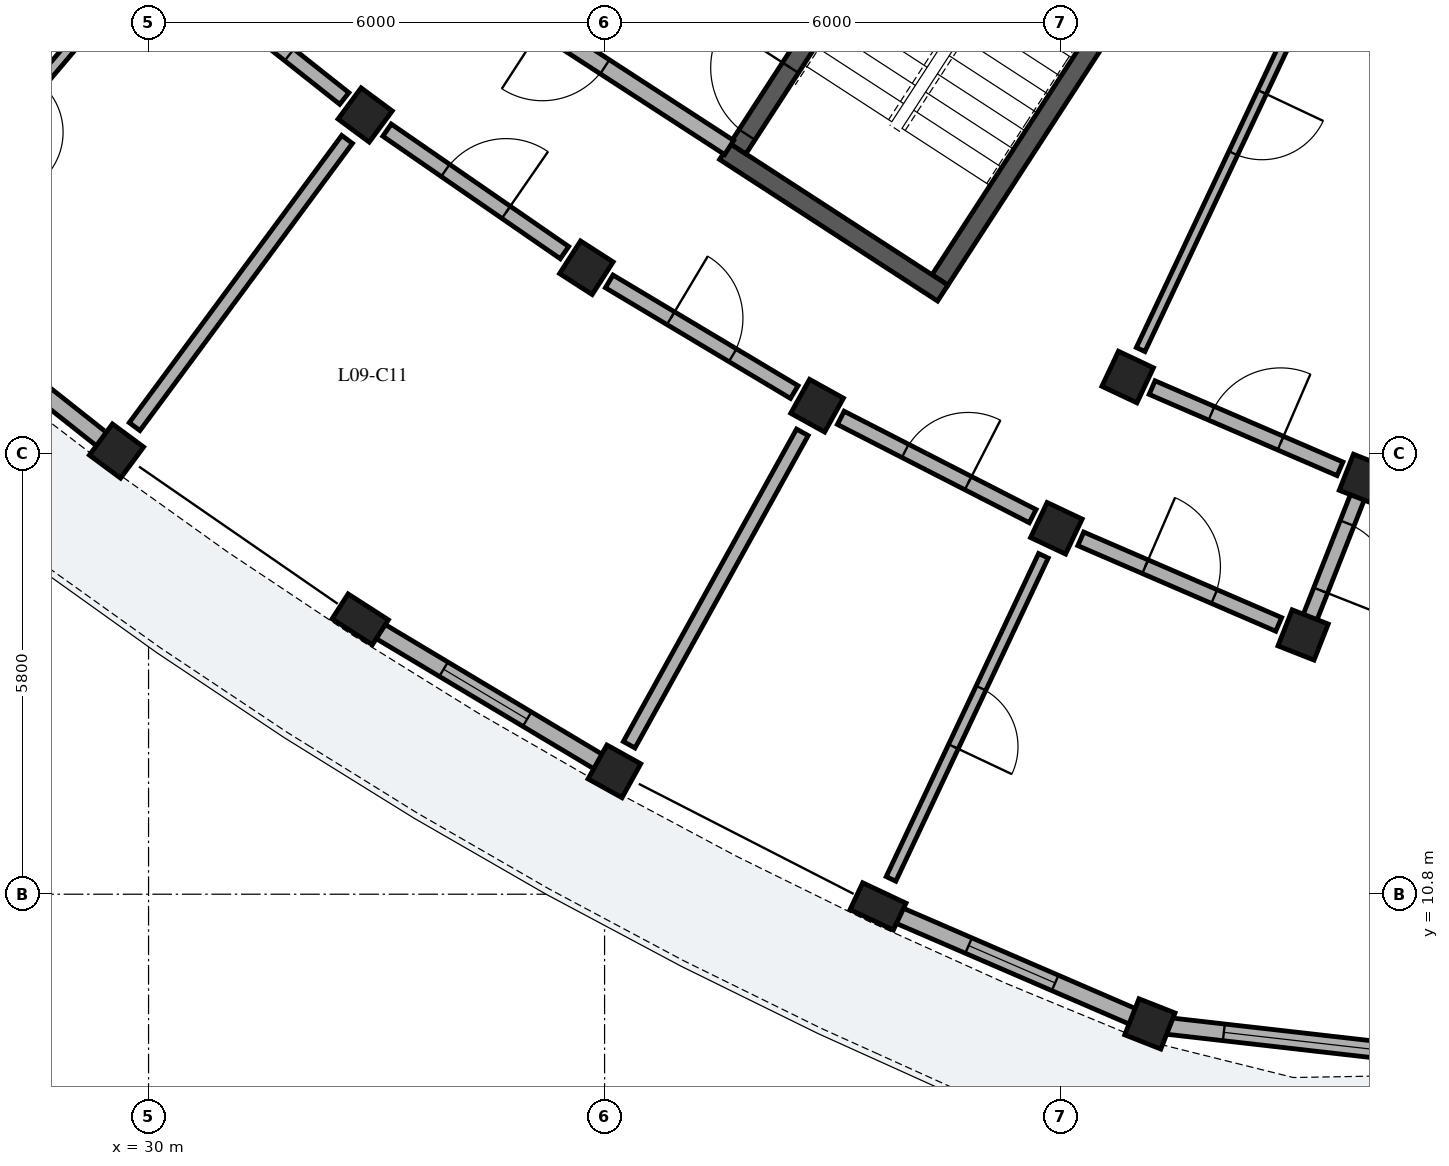
"""IFC4 building model, lengths in metres.
Left out: names, types, materials, properties, quantities, classifications, styles, units other than length and angle.
Written with IfcOpenShell. Run it as: python <this file> out.ifc"""

import sys

from ifc_helpers import new_model, si_unit, direction, frame, frame_2d, origin, origin_2d, place, context, subcontext, project, spatial, rectangle, extrude, element, fill, save


model = new_model("IFC4")
c1 = context("Model", 3, precision=1e-05, world=origin(), true_north=direction((0.0, 1.0)))
c2 = subcontext(c1, "Body", "Model", "MODEL_VIEW")
j1 = project(units=[si_unit("LENGTHUNIT", "METRE"), si_unit("PLANEANGLEUNIT", "RADIAN")], contexts=[c1])
p1 = place(None, origin())
s1 = spatial("IfcSite", under=j1, at=p1, CompositionType="ELEMENT")
p2 = place(p1, origin())
s2 = spatial("IfcBuilding", under=s1, at=p2, CompositionType="ELEMENT")
p3 = place(p2, frame((0.0, 0.0, 32.36)))
s3 = spatial("IfcBuildingStorey", under=s2, at=p3, CompositionType="ELEMENT", Elevation=32.36)
p4 = place(p3, frame((40.413, 18.882, 0.0), z_axis=(0.0, 0.0, 1.0), x_axis=(0.544629435258, 0.838676802022, 0.0)))
e1 = element("IfcWall", 1, at=p4, inside=s3, PredefinedType="SHEAR", context=c2, shape_type="SweptSolid", body=[
    extrude(rectangle(XDim=6.6, YDim=0.25, at=frame_2d((3.3, 0.0))), origin(), (0.0, 0.0, 1.0), 3.11),
])
p5 = place(p3, frame((40.449, 18.709, 0.0), z_axis=(0.0, 0.0, 1.0), x_axis=(-0.838678407117, 0.544626963559, 0.0)))
e2 = element("IfcWall", 2, at=p5, inside=s3, PredefinedType="SHEAR", context=c2, shape_type="SweptSolid", body=[
    extrude(rectangle(XDim=3.42, YDim=0.25, at=frame_2d((1.71, 0.0))), origin(), (0.0, 0.0, 1.0), 3.11),
])
p6 = place(p3, frame((37.754, 20.608, 0.0), z_axis=(0.0, 0.0, 1.0), x_axis=(0.544655453679, 0.838659905312, 0.0)))
e3 = element("IfcWall", 3, at=p6, inside=s3, PredefinedType="SHEAR", context=c2, shape_type="SweptSolid", body=[
    extrude(rectangle(XDim=6.6, YDim=0.25, at=frame_2d((3.3, 0.0))), origin(), (0.0, 0.0, 1.0), 3.11),
])
p7 = place(p6, frame((0.22, 0.0, 0.0)))
e4 = element("IfcOpeningElement", 4, at=p7, cuts=e3, PredefinedType="OPENING", context=c2, shape_type="SweptSolid", body=[
    extrude(rectangle(XDim=1.05, YDim=2.15, at=frame_2d((0.525, 1.075))), frame((0.0, 0.135, 0.0), z_axis=(0.0, -1.0, 0.0), x_axis=(1.0, 0.0, 0.0)), (0.0, 0.0, 1.0), 0.27),
])
for number, where, z_axis, x_axis in (
    (5, (32.85, 21.052, 0.0), (0.0, 0.0, 1.0), (-0.595, -0.804, 0.0)),
    (6, (29.578, 16.63, 0.0), (0.0, 0.0, 1.0), (-0.595, -0.804, 0.0)),
    (7, (35.76, 19.042, 0.0), (0.0, 0.0, 1.0), (-0.541, -0.841, 0.0)),
):
    element("IfcColumn", number, at=place(p3, frame(where, z_axis=z_axis, x_axis=x_axis)), inside=s3, PredefinedType="COLUMN", context=c2, shape_type="SweptSolid", body=[
        extrude(rectangle(XDim=0.51, YDim=0.51, at=origin_2d()), origin(), (0.0, 0.0, 1.0), 3.115),
    ])
p8 = place(p3, frame((32.785, 14.416, 0.0), z_axis=(0.0, 0.0, 1.0), x_axis=(-0.540974471368, -0.841039012964, 0.0)))
e8 = element("IfcColumn", 8, at=p8, inside=s3, PredefinedType="PILASTER", context=c2, shape_type="SweptSolid", body=[
    extrude(rectangle(XDim=0.39, YDim=0.63, at=origin_2d()), origin(), (0.0, 0.0, 1.0), 3.115),
])
for number, where, z_axis, x_axis in (
    (9, (38.796, 17.227, 0.0), (0.0, 0.0, 1.0), (-0.485, -0.875, 0.0)),
    (10, (36.13, 12.417, 0.0), (0.0, 0.0, 1.0), (-0.485, -0.875, 0.0)),
    (11, (42.882, 17.604, 0.0), (0.0, 0.0, 1.0), (-0.427, -0.904, 0.0)),
    (12, (41.944, 15.614, 0.0), (0.0, 0.0, 1.0), (-0.427, -0.904, 0.0)),
):
    element("IfcColumn", number, at=place(p3, frame(where, z_axis=z_axis, x_axis=x_axis)), inside=s3, PredefinedType="COLUMN", context=c2, shape_type="SweptSolid", body=[
        extrude(rectangle(XDim=0.51, YDim=0.51, at=origin_2d()), origin(), (0.0, 0.0, 1.0), 3.115),
    ])
p9 = place(p3, frame((39.598, 10.64, 0.0), z_axis=(0.0, 0.0, 1.0), x_axis=(-0.426568739901, -0.904455145454, 0.0)))
e13 = element("IfcColumn", 13, at=p9, inside=s3, PredefinedType="PILASTER", context=c2, shape_type="SweptSolid", body=[
    extrude(rectangle(XDim=0.39, YDim=0.63, at=origin_2d()), origin(), (0.0, 0.0, 1.0), 3.115),
])
for number, where, z_axis, x_axis in (
    (14, (45.997, 16.258, 0.0), (0.0, 0.0, 1.0), (-0.367, -0.93, 0.0)),
    (15, (45.191, 14.211, 0.0), (0.0, 0.0, 1.0), (-0.367, -0.93, 0.0)),
    (16, (43.175, 9.094, 0.0), (0.0, 0.0, 1.0), (-0.367, -0.93, 0.0)),
):
    element("IfcColumn", number, at=place(p3, frame(where, z_axis=z_axis, x_axis=x_axis)), inside=s3, PredefinedType="COLUMN", context=c2, shape_type="SweptSolid", body=[
        extrude(rectangle(XDim=0.51, YDim=0.51, at=origin_2d()), origin(), (0.0, 0.0, 1.0), 3.115),
    ])
p10 = place(p3, frame((26.653, 18.947, 0.0), z_axis=(0.0, 0.0, 1.0), x_axis=(0.783976646649, -0.620790316861, 0.0)))
e17 = element("IfcWall", 17, at=p10, inside=s3, PredefinedType="SOLIDWALL", context=c2, shape_type="SweptSolid", body=[
    extrude(rectangle(XDim=3.507, YDim=0.22, at=frame_2d((1.753, 0.0))), origin(), (0.0, 0.0, 1.0), 2.355),
])
p11 = place(p10, frame((0.928, 0.0, 0.35)))
e18 = element("IfcOpeningElement", 18, at=p11, cuts=e17, PredefinedType="OPENING", context=c2, shape_type="SweptSolid", body=[
    extrude(rectangle(XDim=1.65, YDim=1.8, at=frame_2d((0.825, 0.9))), frame((0.0, 0.12, 0.0), z_axis=(0.0, -1.0, 0.0), x_axis=(1.0, 0.0, 0.0)), (0.0, 0.0, 1.0), 0.24),
])
p12 = place(p3, frame((32.927, 14.332, 0.0), z_axis=(0.0, 0.0, 1.0), x_axis=(0.858272027283, -0.513195018666, 0.0)))
e19 = element("IfcWall", 19, at=p12, inside=s3, PredefinedType="SOLIDWALL", context=c2, shape_type="SweptSolid", body=[
    extrude(rectangle(XDim=3.507, YDim=0.22, at=frame_2d((1.753, 0.0))), origin(), (0.0, 0.0, 1.0), 2.355),
])
p13 = place(p12, frame((1.113, 0.0, 0.55)))
e20 = element("IfcOpeningElement", 20, at=p13, cuts=e19, PredefinedType="OPENING", context=c2, shape_type="SweptSolid", body=[
    extrude(rectangle(XDim=1.28, YDim=1.52, at=frame_2d((0.64, 0.76))), frame((0.0, 0.12, 0.0), z_axis=(0.0, -1.0, 0.0), x_axis=(1.0, 0.0, 0.0)), (0.0, 0.0, 1.0), 0.24),
])
p14 = place(p3, frame((39.749, 10.574, 0.0), z_axis=(0.0, 0.0, 1.0), x_axis=(0.917923514364, -0.396757384024, 0.0)))
e21 = element("IfcWall", 21, at=p14, inside=s3, PredefinedType="SOLIDWALL", context=c2, shape_type="SweptSolid", body=[
    extrude(rectangle(XDim=3.507, YDim=0.22, at=frame_2d((1.753, 0.0))), origin(), (0.0, 0.0, 1.0), 2.355),
])
p15 = place(p14, frame((1.133, 0.0, 0.55)))
e22 = element("IfcOpeningElement", 22, at=p15, cuts=e21, PredefinedType="OPENING", context=c2, shape_type="SweptSolid", body=[
    extrude(rectangle(XDim=1.24, YDim=1.535, at=frame_2d((0.62, 0.768))), frame((0.0, 0.12, 0.0), z_axis=(0.0, -1.0, 0.0), x_axis=(1.0, 0.0, 0.0)), (0.0, 0.0, 1.0), 0.24),
])
p16 = place(p3, frame((47.058, 8.651, 0.0), z_axis=(0.0, 0.0, 1.0), x_axis=(-0.993565852845, 0.113255887533, 0.0)))
e23 = element("IfcWall", 23, at=p16, inside=s3, PredefinedType="SOLIDWALL", context=c2, shape_type="SweptSolid", body=[
    extrude(rectangle(XDim=3.908, YDim=0.22, at=frame_2d((1.954, 0.0))), origin(), (0.0, 0.0, 1.0), 2.355),
])
p17 = place(p16, frame((0.979, 0.0, 0.4)))
e24 = element("IfcOpeningElement", 24, at=p17, cuts=e23, PredefinedType="OPENING", context=c2, shape_type="SweptSolid", body=[
    extrude(rectangle(XDim=1.95, YDim=1.78, at=frame_2d((0.975, 0.89))), frame((0.0, 0.12, 0.0), z_axis=(0.0, -1.0, 0.0), x_axis=(1.0, 0.0, 0.0)), (0.0, 0.0, 1.0), 0.24),
])
p18 = place(p3, frame((37.639, 20.623, 0.0), z_axis=(0.0, 0.0, 1.0), x_axis=(-0.838681446513, 0.544622283124, 0.0)))
e25 = element("IfcWall", 25, at=p18, inside=s3, PredefinedType="PARTITIONING", context=c2, shape_type="SweptSolid", body=[
    extrude(rectangle(XDim=4.9, YDim=0.22, at=frame_2d((2.45, 0.0))), origin(), (0.0, 0.0, 1.0), 2.34),
])
p19 = place(p18, frame((1.95, 0.0, 0.0)))
e26 = element("IfcOpeningElement", 26, at=p19, cuts=e25, PredefinedType="OPENING", context=c2, shape_type="SweptSolid", body=[
    extrude(rectangle(XDim=0.98, YDim=2.14, at=frame_2d((0.49, 1.07))), frame((0.0, 0.12, 0.0), z_axis=(0.0, -1.0, 0.0), x_axis=(1.0, 0.0, 0.0)), (0.0, 0.0, 1.0), 0.24),
])
p20 = place(p3, frame((29.819, 22.942, 0.0), z_axis=(0.0, 0.0, 1.0), x_axis=(-0.646137818229, -0.76322075434, 0.0)))
e27 = element("IfcWall", 27, at=p20, inside=s3, PredefinedType="PLUMBINGWALL", context=c2, shape_type="SweptSolid", body=[
    extrude(rectangle(XDim=4.7, YDim=0.14, at=frame_2d((2.35, 0.0))), origin(), (0.0, 0.0, 1.0), 2.37),
])
p21 = place(p20, frame((1.925, 0.0, 0.0)))
e28 = element("IfcOpeningElement", 28, at=p21, cuts=e27, PredefinedType="OPENING", context=c2, shape_type="SweptSolid", body=[
    extrude(rectangle(XDim=0.85, YDim=2.05, at=frame_2d((0.425, 1.025))), frame((0.0, 0.08, 0.0), z_axis=(0.0, -1.0, 0.0), x_axis=(1.0, 0.0, 0.0)), (0.0, 0.0, 1.0), 0.16),
])
p22 = place(p3, frame((30.351, 23.03, 0.0), z_axis=(0.0, 0.0, 1.0), x_axis=(0.783965548427, -0.620804332201, 0.0)))
e29 = element("IfcWall", 29, at=p22, inside=s3, PredefinedType="PARTITIONING", context=c2, shape_type="SweptSolid", body=[
    extrude(rectangle(XDim=2.837, YDim=0.195, at=frame_2d((1.418, 0.0))), origin(), (0.0, 0.0, 1.0), 2.37),
])
p23 = place(p22, frame((0.924, 0.0, 0.0)))
e30 = element("IfcOpeningElement", 30, at=p23, cuts=e29, PredefinedType="OPENING", context=c2, shape_type="SweptSolid", body=[
    extrude(rectangle(XDim=0.99, YDim=2.16, at=frame_2d((0.495, 1.08))), frame((0.0, 0.107, 0.0), z_axis=(0.0, -1.0, 0.0), x_axis=(1.0, 0.0, 0.0)), (0.0, 0.0, 1.0), 0.215),
])
p24 = place(p3, frame((32.612, 20.73, 0.0), z_axis=(0.0, 0.0, 1.0), x_axis=(-0.59482622273, -0.803854318116, 0.0)))
e31 = element("IfcWall", 31, at=p24, inside=s3, PredefinedType="PARTITIONING", context=c2, shape_type="SweptSolid", body=[
    extrude(rectangle(XDim=4.7, YDim=0.175, at=frame_2d((2.35, 0.0))), origin(), (0.0, 0.0, 1.0), 2.37),
])
p25 = place(p3, frame((33.138, 20.853, 0.0), z_axis=(0.0, 0.0, 1.0), x_axis=(0.822870075235, -0.568229565653, 0.0)))
e32 = element("IfcWall", 32, at=p25, inside=s3, PredefinedType="PARTITIONING", context=c2, shape_type="SweptSolid", body=[
    extrude(rectangle(XDim=2.837, YDim=0.195, at=frame_2d((1.418, 0.0))), origin(), (0.0, 0.0, 1.0), 2.37),
])
p26 = place(p25, frame((0.934, 0.0, 0.0)))
e33 = element("IfcOpeningElement", 33, at=p26, cuts=e32, PredefinedType="OPENING", context=c2, shape_type="SweptSolid", body=[
    extrude(rectangle(XDim=0.97, YDim=2.15, at=frame_2d((0.485, 1.075))), frame((0.0, 0.107, 0.0), z_axis=(0.0, -1.0, 0.0), x_axis=(1.0, 0.0, 0.0)), (0.0, 0.0, 1.0), 0.215),
])
p27 = place(p3, frame((36.061, 18.862, 0.0), z_axis=(0.0, 0.0, 1.0), x_axis=(0.858281647443, -0.51317892948, 0.0)))
e34 = element("IfcWall", 34, at=p27, inside=s3, PredefinedType="PARTITIONING", context=c2, shape_type="SweptSolid", body=[
    extrude(rectangle(XDim=2.837, YDim=0.195, at=frame_2d((1.418, 0.0))), origin(), (0.0, 0.0, 1.0), 2.37),
])
p28 = place(p27, frame((0.944, 0.0, 0.0)))
e35 = element("IfcOpeningElement", 35, at=p28, cuts=e34, PredefinedType="OPENING", context=c2, shape_type="SweptSolid", body=[
    extrude(rectangle(XDim=0.95, YDim=2.13, at=frame_2d((0.475, 1.065))), frame((0.0, 0.107, 0.0), z_axis=(0.0, -1.0, 0.0), x_axis=(1.0, 0.0, 0.0)), (0.0, 0.0, 1.0), 0.215),
])
p29 = place(p3, frame((38.602, 16.877, 0.0), z_axis=(0.0, 0.0, 1.0), x_axis=(-0.484813534336, -0.874617537513, 0.0)))
e36 = element("IfcWall", 36, at=p29, inside=s3, PredefinedType="PARTITIONING", context=c2, shape_type="SweptSolid", body=[
    extrude(rectangle(XDim=4.7, YDim=0.175, at=frame_2d((2.35, 0.0))), origin(), (0.0, 0.0, 1.0), 2.37),
])
p30 = place(p3, frame((39.107, 17.067, 0.0), z_axis=(0.0, 0.0, 1.0), x_axis=(0.890030590607, -0.45590080915, 0.0)))
e37 = element("IfcWall", 37, at=p30, inside=s3, PredefinedType="PARTITIONING", context=c2, shape_type="SweptSolid", body=[
    extrude(rectangle(XDim=2.837, YDim=0.195, at=frame_2d((1.418, 0.0))), origin(), (0.0, 0.0, 1.0), 2.37),
])
p31 = place(p30, frame((0.954, 0.0, 0.0)))
e38 = element("IfcOpeningElement", 38, at=p31, cuts=e37, PredefinedType="OPENING", context=c2, shape_type="SweptSolid", body=[
    extrude(rectangle(XDim=0.93, YDim=2.12, at=frame_2d((0.465, 1.06))), frame((0.0, 0.107, 0.0), z_axis=(0.0, -1.0, 0.0), x_axis=(1.0, 0.0, 0.0)), (0.0, 0.0, 1.0), 0.215),
])
p32 = place(p3, frame((41.773, 15.252, 0.0), z_axis=(0.0, 0.0, 1.0), x_axis=(-0.426567365945, -0.904455793453, 0.0)))
e39 = element("IfcWall", 39, at=p32, inside=s3, PredefinedType="PLUMBINGWALL", context=c2, shape_type="SweptSolid", body=[
    extrude(rectangle(XDim=4.7, YDim=0.14, at=frame_2d((2.35, 0.0))), origin(), (0.0, 0.0, 1.0), 2.37),
])
p33 = place(p32, frame((1.925, 0.0, 0.0)))
e40 = element("IfcOpeningElement", 40, at=p33, cuts=e39, PredefinedType="OPENING", context=c2, shape_type="SweptSolid", body=[
    extrude(rectangle(XDim=0.85, YDim=2.05, at=frame_2d((0.425, 1.025))), frame((0.0, 0.08, 0.0), z_axis=(0.0, -1.0, 0.0), x_axis=(1.0, 0.0, 0.0)), (0.0, 0.0, 1.0), 0.16),
])
p34 = place(p3, frame((45.868, 23.935, 0.0), z_axis=(0.0, 0.0, 1.0), x_axis=(-0.426573573579, -0.904452865728, 0.0)))
e41 = element("IfcWall", 41, at=p34, inside=s3, PredefinedType="PARTITIONING", context=c2, shape_type="SweptSolid", body=[
    extrude(rectangle(XDim=6.6, YDim=0.125, at=frame_2d((3.3, 0.0))), origin(), (0.0, 0.0, 1.0), 2.37),
])
p35 = place(p34, frame((2.855, 0.0, 0.0)))
e42 = element("IfcOpeningElement", 42, at=p35, cuts=e41, PredefinedType="OPENING", context=c2, shape_type="SweptSolid", body=[
    extrude(rectangle(XDim=0.89, YDim=2.1, at=frame_2d((0.445, 1.05))), frame((0.0, 0.073, 0.0), z_axis=(0.0, -1.0, 0.0), x_axis=(1.0, 0.0, 0.0)), (0.0, 0.0, 1.0), 0.145),
])
p36 = place(p3, frame((42.265, 15.475, 0.0), z_axis=(0.0, 0.0, 1.0), x_axis=(0.917943439406, -0.396711282991, 0.0)))
e43 = element("IfcWall", 43, at=p36, inside=s3, PredefinedType="PARTITIONING", context=c2, shape_type="SweptSolid", body=[
    extrude(rectangle(XDim=2.837, YDim=0.195, at=frame_2d((1.418, 0.0))), origin(), (0.0, 0.0, 1.0), 2.37),
])
p37 = place(p36, frame((0.924, 0.0, 0.0)))
e44 = element("IfcOpeningElement", 44, at=p37, cuts=e43, PredefinedType="OPENING", context=c2, shape_type="SweptSolid", body=[
    extrude(rectangle(XDim=0.99, YDim=2.16, at=frame_2d((0.495, 1.08))), frame((0.0, 0.107, 0.0), z_axis=(0.0, -1.0, 0.0), x_axis=(1.0, 0.0, 0.0)), (0.0, 0.0, 1.0), 0.215),
])
p38 = place(p3, frame((43.204, 17.465, 0.0), z_axis=(0.0, 0.0, 1.0), x_axis=(0.91793557165, -0.39672948756, 0.0)))
e45 = element("IfcWall", 45, at=p38, inside=s3, PredefinedType="PARTITIONING", context=c2, shape_type="SweptSolid", body=[
    extrude(rectangle(XDim=2.693, YDim=0.195, at=frame_2d((1.346, 0.0))), origin(), (0.0, 0.0, 1.0), 2.37),
])
p39 = place(p38, frame((0.852, 0.0, 0.0)))
e46 = element("IfcOpeningElement", 46, at=p39, cuts=e45, PredefinedType="OPENING", context=c2, shape_type="SweptSolid", body=[
    extrude(rectangle(XDim=0.99, YDim=2.16, at=frame_2d((0.495, 1.08))), frame((0.0, 0.107, 0.0), z_axis=(0.0, -1.0, 0.0), x_axis=(1.0, 0.0, 0.0)), (0.0, 0.0, 1.0), 0.215),
])
p40 = place(p3, frame((45.979, 16.211, 0.0), z_axis=(0.0, 0.0, 1.0), x_axis=(-0.366454372645, -0.930436022932, 0.0)))
e47 = element("IfcWall", 47, at=p40, inside=s3, PredefinedType="PARTITIONING", context=c2, shape_type="SweptSolid", body=[
    extrude(rectangle(XDim=2.1, YDim=0.195, at=frame_2d((1.05, 0.0))), origin(), (0.0, 0.0, 1.0), 2.37),
])
p41 = place(p40, frame((0.57, 0.0, 0.0)))
e48 = element("IfcOpeningElement", 48, at=p41, cuts=e47, PredefinedType="OPENING", context=c2, shape_type="SweptSolid", body=[
    extrude(rectangle(XDim=0.95, YDim=2.13, at=frame_2d((0.475, 1.065))), frame((0.0, 0.107, 0.0), z_axis=(0.0, -1.0, 0.0), x_axis=(1.0, 0.0, 0.0)), (0.0, 0.0, 1.0), 0.215),
])
p42 = place(p13, origin())
e49 = element("IfcWindow", 49, at=p42, inside=s3, PartitioningType="SINGLE_PANEL", PredefinedType="WINDOW", context=c2, shape_type="SweptSolid", body=[
    extrude(rectangle(XDim=1.28, YDim=1.52, at=frame_2d((0.64, 0.76))), frame((0.0, 0.03, 0.0), z_axis=(0.0, -1.0, 0.0), x_axis=(1.0, 0.0, 0.0)), (0.0, 0.0, 1.0), 0.06),
])
fill(e20, e49)
p43 = place(p15, origin())
e50 = element("IfcWindow", 50, at=p43, inside=s3, PartitioningType="SINGLE_PANEL", PredefinedType="WINDOW", context=c2, shape_type="SweptSolid", body=[
    extrude(rectangle(XDim=1.24, YDim=1.535, at=frame_2d((0.62, 0.768))), frame((0.0, 0.03, 0.0), z_axis=(0.0, -1.0, 0.0), x_axis=(1.0, 0.0, 0.0)), (0.0, 0.0, 1.0), 0.06),
])
fill(e22, e50)
p44 = place(p17, origin())
e51 = element("IfcWindow", 51, at=p44, inside=s3, PartitioningType="SINGLE_PANEL", PredefinedType="WINDOW", context=c2, shape_type="SweptSolid", body=[
    extrude(rectangle(XDim=1.95, YDim=1.78, at=frame_2d((0.975, 0.89))), frame((0.0, 0.03, 0.0), z_axis=(0.0, -1.0, 0.0), x_axis=(1.0, 0.0, 0.0)), (0.0, 0.0, 1.0), 0.06),
])
fill(e24, e51)
p45 = place(p7, origin())
e52 = element("IfcDoor", 52, at=p45, inside=s3, OperationType="SINGLE_SWING_RIGHT", PredefinedType="DOOR", context=c2, shape_type="SweptSolid", body=[
    extrude(rectangle(XDim=1.05, YDim=2.15, at=frame_2d((0.525, 1.075))), frame((0.0, 0.025, 0.0), z_axis=(0.0, -1.0, 0.0), x_axis=(1.0, 0.0, 0.0)), (0.0, 0.0, 1.0), 0.05),
])
fill(e4, e52)
p46 = place(p19, origin())
e53 = element("IfcDoor", 53, at=p46, inside=s3, OperationType="SINGLE_SWING_RIGHT", PredefinedType="DOOR", context=c2, shape_type="SweptSolid", body=[
    extrude(rectangle(XDim=0.98, YDim=2.14, at=frame_2d((0.49, 1.07))), frame((0.0, 0.025, 0.0), z_axis=(0.0, -1.0, 0.0), x_axis=(1.0, 0.0, 0.0)), (0.0, 0.0, 1.0), 0.05),
])
fill(e26, e53)
p47 = place(p23, origin())
e54 = element("IfcDoor", 54, at=p47, inside=s3, OperationType="SINGLE_SWING_LEFT", PredefinedType="DOOR", context=c2, shape_type="SweptSolid", body=[
    extrude(rectangle(XDim=0.99, YDim=2.16, at=frame_2d((0.495, 1.08))), frame((0.0, 0.025, 0.0), z_axis=(0.0, -1.0, 0.0), x_axis=(1.0, 0.0, 0.0)), (0.0, 0.0, 1.0), 0.05),
])
fill(e30, e54)
p48 = place(p26, origin())
e55 = element("IfcDoor", 55, at=p48, inside=s3, OperationType="SINGLE_SWING_RIGHT", PredefinedType="DOOR", context=c2, shape_type="SweptSolid", body=[
    extrude(rectangle(XDim=0.97, YDim=2.15, at=frame_2d((0.485, 1.075))), frame((0.0, 0.025, 0.0), z_axis=(0.0, -1.0, 0.0), x_axis=(1.0, 0.0, 0.0)), (0.0, 0.0, 1.0), 0.05),
])
fill(e33, e55)
p49 = place(p28, origin())
e56 = element("IfcDoor", 56, at=p49, inside=s3, OperationType="SINGLE_SWING_LEFT", PredefinedType="DOOR", context=c2, shape_type="SweptSolid", body=[
    extrude(rectangle(XDim=0.95, YDim=2.13, at=frame_2d((0.475, 1.065))), frame((0.0, 0.025, 0.0), z_axis=(0.0, -1.0, 0.0), x_axis=(1.0, 0.0, 0.0)), (0.0, 0.0, 1.0), 0.05),
])
fill(e35, e56)
p50 = place(p31, origin())
e57 = element("IfcDoor", 57, at=p50, inside=s3, OperationType="SINGLE_SWING_RIGHT", PredefinedType="DOOR", context=c2, shape_type="SweptSolid", body=[
    extrude(rectangle(XDim=0.93, YDim=2.12, at=frame_2d((0.465, 1.06))), frame((0.0, 0.025, 0.0), z_axis=(0.0, -1.0, 0.0), x_axis=(1.0, 0.0, 0.0)), (0.0, 0.0, 1.0), 0.05),
])
fill(e38, e57)
p51 = place(p33, origin())
e58 = element("IfcDoor", 58, at=p51, inside=s3, OperationType="SINGLE_SWING_RIGHT", PredefinedType="DOOR", context=c2, shape_type="SweptSolid", body=[
    extrude(rectangle(XDim=0.85, YDim=2.05, at=frame_2d((0.425, 1.025))), frame((0.0, 0.025, 0.0), z_axis=(0.0, -1.0, 0.0), x_axis=(1.0, 0.0, 0.0)), (0.0, 0.0, 1.0), 0.05),
])
fill(e40, e58)
p52 = place(p35, origin())
e59 = element("IfcDoor", 59, at=p52, inside=s3, OperationType="SINGLE_SWING_LEFT", PredefinedType="DOOR", context=c2, shape_type="SweptSolid", body=[
    extrude(rectangle(XDim=0.89, YDim=2.1, at=frame_2d((0.445, 1.05))), frame((0.0, 0.025, 0.0), z_axis=(0.0, -1.0, 0.0), x_axis=(1.0, 0.0, 0.0)), (0.0, 0.0, 1.0), 0.05),
])
fill(e42, e59)
p53 = place(p37, origin())
e60 = element("IfcDoor", 60, at=p53, inside=s3, OperationType="SINGLE_SWING_LEFT", PredefinedType="DOOR", context=c2, shape_type="SweptSolid", body=[
    extrude(rectangle(XDim=0.99, YDim=2.16, at=frame_2d((0.495, 1.08))), frame((0.0, 0.025, 0.0), z_axis=(0.0, -1.0, 0.0), x_axis=(1.0, 0.0, 0.0)), (0.0, 0.0, 1.0), 0.05),
])
fill(e44, e60)
p54 = place(p39, origin())
e61 = element("IfcDoor", 61, at=p54, inside=s3, OperationType="SINGLE_SWING_RIGHT", PredefinedType="DOOR", context=c2, shape_type="SweptSolid", body=[
    extrude(rectangle(XDim=0.99, YDim=2.16, at=frame_2d((0.495, 1.08))), frame((0.0, 0.025, 0.0), z_axis=(0.0, -1.0, 0.0), x_axis=(1.0, 0.0, 0.0)), (0.0, 0.0, 1.0), 0.05),
])
fill(e46, e61)
p55 = place(p41, origin())
e62 = element("IfcDoor", 62, at=p55, inside=s3, OperationType="SINGLE_SWING_RIGHT", PredefinedType="DOOR", context=c2, shape_type="SweptSolid", body=[
    extrude(rectangle(XDim=0.95, YDim=2.13, at=frame_2d((0.475, 1.065))), frame((0.0, 0.025, 0.0), z_axis=(0.0, -1.0, 0.0), x_axis=(1.0, 0.0, 0.0)), (0.0, 0.0, 1.0), 0.05),
])
fill(e48, e62)
save(model, sys.argv[1])
